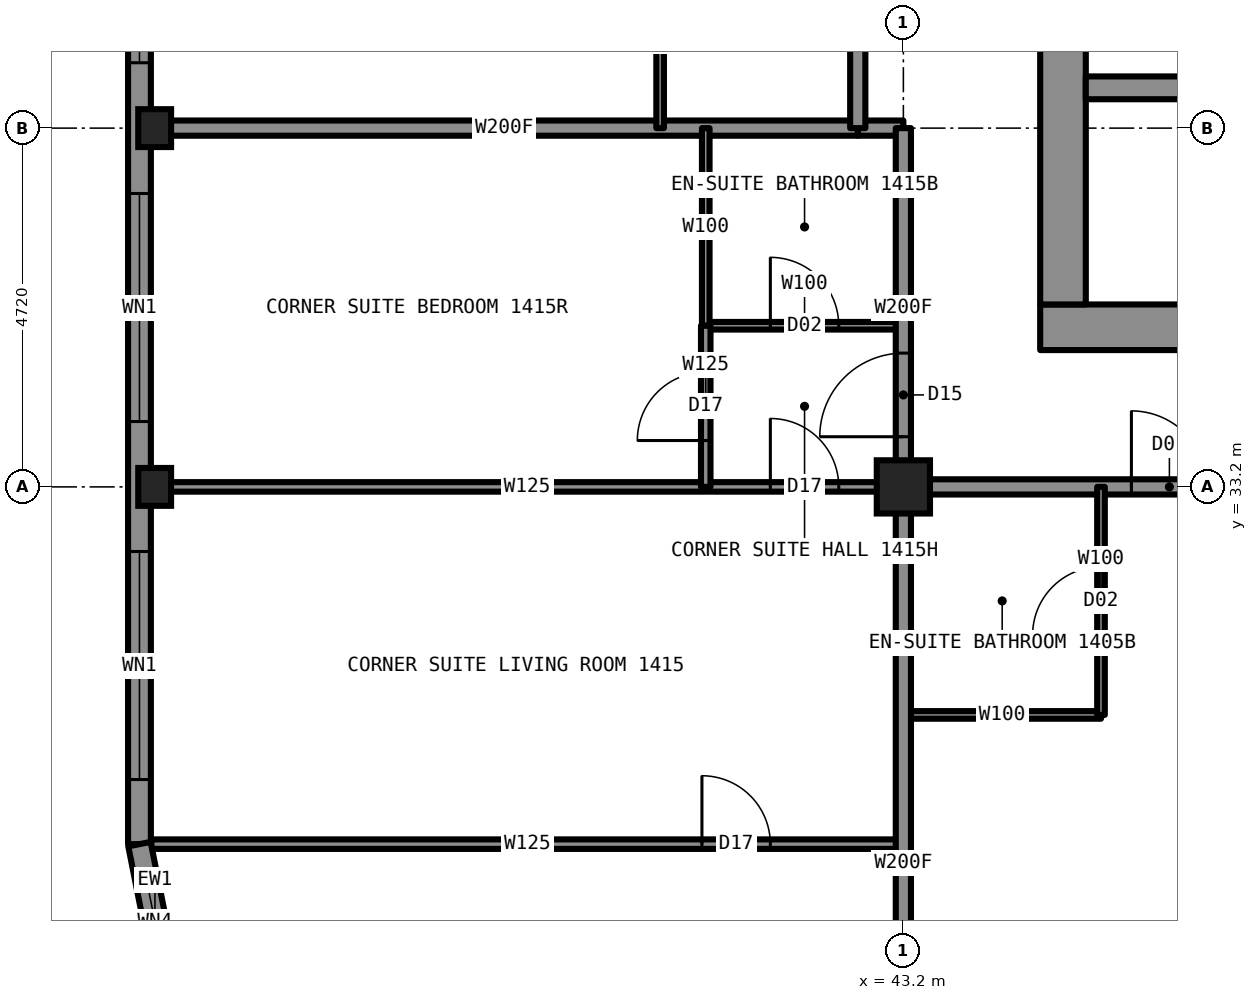
"""IFC4 building model, lengths in metres.
Left out: names, types, materials, properties, quantities, classifications, styles, units other than length and angle.
Written with IfcOpenShell. Run it as: python <this file> out.ifc"""

import sys

from ifc_helpers import new_model, si_unit, direction, frame, frame_2d, origin, origin_2d, place, context, subcontext, project, spatial, rectangle, hollow_rectangle, i_section, extrude, element, fill, save


model = new_model("IFC4")
c1 = context("Model", 3, precision=1e-05, world=origin(), true_north=direction((0.0, 1.0)))
c2 = subcontext(c1, "Body", "Model", "MODEL_VIEW")
j1 = project(units=[si_unit("LENGTHUNIT", "METRE"), si_unit("PLANEANGLEUNIT", "RADIAN")], contexts=[c1])
p1 = place(None, origin())
s1 = spatial("IfcSite", under=j1, at=p1, CompositionType="ELEMENT")
p2 = place(p1, origin())
s2 = spatial("IfcBuilding", under=s1, at=p2, CompositionType="ELEMENT")
p3 = place(p2, frame((0.0, 0.0, 49.5)))
s3 = spatial("IfcBuildingStorey", under=s2, at=p3, CompositionType="ELEMENT", Elevation=49.5)
for number, where, z_axis, x_axis in (
    (1, (33.35, 33.2, 0.0), (0.0, 0.0, 1.0), (1.0, 0.0, 0.0)),
    (2, (33.35, 37.92, 0.0), (0.0, 0.0, 1.0), (1.0, 0.0, 0.0)),
):
    element("IfcColumn", number, at=place(p3, frame(where, z_axis=z_axis, x_axis=x_axis)), inside=s3, PredefinedType="COLUMN", context=c2, shape_type="SweptSolid", body=[
        extrude(i_section(OverallWidth=0.432, OverallDepth=0.498, WebThickness=0.056, FlangeThickness=0.089, at=origin_2d()), origin(), (0.0, 0.0, 1.0), 3.5),
    ])
p4 = place(p3, frame((43.2, 33.2, 0.0), z_axis=(0.0, 0.0, 1.0), x_axis=(1.0, 0.0, 0.0)))
e3 = element("IfcColumn", 3, at=p4, inside=s3, PredefinedType="COLUMN", context=c2, shape_type="SweptSolid", body=[
    extrude(hollow_rectangle(XDim=0.7, YDim=0.7, WallThickness=0.06, at=origin_2d()), origin(), (0.0, 0.0, 1.0), 3.5),
])
p5 = place(p3, frame((45.0, 35.3, 0.0), z_axis=(0.0, 0.0, 1.0), x_axis=(1.0, 0.0, 0.0)))
e4 = element("IfcWall", 4, at=p5, inside=s3, PredefinedType="SHEAR", context=c2, shape_type="SweptSolid", body=[
    extrude(rectangle(XDim=20.0, YDim=0.6, at=frame_2d((10.0, 0.0))), origin(), (0.0, 0.0, 1.0), 3.5),
])
p6 = place(p3, frame((45.3, 35.6, 0.0), z_axis=(0.0, 0.0, 1.0), x_axis=(0.0, 1.0, 0.0)))
e5 = element("IfcWall", 5, at=p6, inside=s3, PredefinedType="SHEAR", context=c2, shape_type="SweptSolid", body=[
    extrude(rectangle(XDim=18.8, YDim=0.6, at=frame_2d((9.4, 0.0))), origin(), (0.0, 0.0, 1.0), 3.5),
])
p7 = place(p6, frame((13.4, 0.0, 0.0)))
e6 = element("IfcOpeningElement", 6, at=p7, cuts=e5, PredefinedType="OPENING", context=c2, shape_type="SweptSolid", body=[
    extrude(rectangle(XDim=1.8, YDim=2.2, at=frame_2d((0.9, 1.1))), frame((0.0, 0.31, 0.0), z_axis=(0.0, -1.0, 0.0), x_axis=(1.0, 0.0, 0.0)), (0.0, 0.0, 1.0), 0.62),
])
p8 = place(p6, frame((3.6, 0.0, 0.0)))
e7 = element("IfcOpeningElement", 7, at=p8, cuts=e5, PredefinedType="OPENING", context=c2, shape_type="SweptSolid", body=[
    extrude(rectangle(XDim=1.8, YDim=2.2, at=frame_2d((0.9, 1.1))), frame((0.0, 0.31, 0.0), z_axis=(0.0, -1.0, 0.0), x_axis=(1.0, 0.0, 0.0)), (0.0, 0.0, 1.0), 0.62),
])
p9 = place(p6, frame((6.4, 0.0, 0.0)))
e8 = element("IfcOpeningElement", 8, at=p9, cuts=e5, PredefinedType="OPENING", context=c2, shape_type="SweptSolid", body=[
    extrude(rectangle(XDim=1.2, YDim=2.2, at=frame_2d((0.6, 1.1))), frame((0.0, 0.31, 0.0), z_axis=(0.0, -1.0, 0.0), x_axis=(1.0, 0.0, 0.0)), (0.0, 0.0, 1.0), 0.62),
])
p10 = place(p3, frame((45.6, 38.45, 0.0), z_axis=(0.0, 0.0, 1.0), x_axis=(1.0, 0.0, 0.0)))
e9 = element("IfcWall", 9, at=p10, inside=s3, PredefinedType="SHEAR", context=c2, shape_type="SweptSolid", body=[
    extrude(rectangle(XDim=18.8, YDim=0.3, at=frame_2d((9.4, 0.0))), origin(), (0.0, 0.0, 1.0), 3.5),
])
p11 = place(p3, frame((43.2, 33.2, 0.0), z_axis=(0.0, 0.0, 1.0), x_axis=(1.0, 0.0, 0.0)))
e10 = element("IfcWall", 10, at=p11, inside=s3, PredefinedType="PARTITIONING", context=c2, shape_type="SweptSolid", body=[
    extrude(rectangle(XDim=23.6, YDim=0.2, at=frame_2d((11.8, 0.0))), origin(), (0.0, 0.0, 1.0), 3.33),
])
p12 = place(p11, frame((3.0, 0.0, 0.0)))
e11 = element("IfcOpeningElement", 11, at=p12, cuts=e10, PredefinedType="OPENING", context=c2, shape_type="SweptSolid", body=[
    extrude(rectangle(XDim=1.0, YDim=2.2, at=frame_2d((0.5, 1.1))), frame((0.0, 0.11, 0.0), z_axis=(0.0, -1.0, 0.0), x_axis=(1.0, 0.0, 0.0)), (0.0, 0.0, 1.0), 0.22),
])
p13 = place(p11, frame((12.44, 0.0, 0.0)))
e12 = element("IfcOpeningElement", 12, at=p13, cuts=e10, PredefinedType="OPENING", context=c2, shape_type="SweptSolid", body=[
    extrude(rectangle(XDim=1.0, YDim=2.2, at=frame_2d((0.5, 1.1))), frame((0.0, 0.11, 0.0), z_axis=(0.0, -1.0, 0.0), x_axis=(1.0, 0.0, 0.0)), (0.0, 0.0, 1.0), 0.22),
])
p14 = place(p11, frame((19.28, 0.0, 0.0)))
e13 = element("IfcOpeningElement", 13, at=p14, cuts=e10, PredefinedType="OPENING", context=c2, shape_type="SweptSolid", body=[
    extrude(rectangle(XDim=1.0, YDim=2.2, at=frame_2d((0.5, 1.1))), frame((0.0, 0.11, 0.0), z_axis=(0.0, -1.0, 0.0), x_axis=(1.0, 0.0, 0.0)), (0.0, 0.0, 1.0), 0.22),
])
p15 = place(p3, frame((33.3, 33.2, 0.0), z_axis=(0.0, 0.0, 1.0), x_axis=(1.0, 0.0, 0.0)))
e14 = element("IfcWall", 14, at=p15, inside=s3, PredefinedType="PARTITIONING", context=c2, shape_type="SweptSolid", body=[
    extrude(rectangle(XDim=9.9, YDim=0.125, at=frame_2d((4.95, 0.0))), origin(), (0.0, 0.0, 1.0), 2.573),
])
p16 = place(p15, frame((8.15, 0.0, 0.0)))
e15 = element("IfcOpeningElement", 15, at=p16, cuts=e14, PredefinedType="OPENING", context=c2, shape_type="SweptSolid", body=[
    extrude(rectangle(XDim=0.9, YDim=2.2, at=frame_2d((0.45, 1.1))), frame((0.0, 0.073, 0.0), z_axis=(0.0, -1.0, 0.0), x_axis=(1.0, 0.0, 0.0)), (0.0, 0.0, 1.0), 0.145),
])
p17 = place(p3, frame((43.2, 30.2, 0.0), z_axis=(0.0, 0.0, 1.0), x_axis=(1.0, 0.0, 0.0)))
e16 = element("IfcWall", 16, at=p17, inside=s3, PredefinedType="PARTITIONING", context=c2, shape_type="SweptSolid", body=[
    extrude(rectangle(XDim=2.6, YDim=0.1, at=frame_2d((1.3, 0.0))), origin(), (0.0, 0.0, 1.0), 3.33),
])
p18 = place(p3, frame((33.306, 28.5, 0.0), z_axis=(0.0, 0.0, 1.0), x_axis=(1.0, 0.0, 0.0)))
e17 = element("IfcWall", 17, at=p18, inside=s3, PredefinedType="PARTITIONING", context=c2, shape_type="SweptSolid", body=[
    extrude(rectangle(XDim=9.894, YDim=0.125, at=frame_2d((4.947, 0.0))), origin(), (0.0, 0.0, 1.0), 3.33),
])
p19 = place(p18, frame((7.244, 0.0, 0.0)))
e18 = element("IfcOpeningElement", 18, at=p19, cuts=e17, PredefinedType="OPENING", context=c2, shape_type="SweptSolid", body=[
    extrude(rectangle(XDim=0.9, YDim=2.2, at=frame_2d((0.45, 1.1))), frame((0.0, 0.073, 0.0), z_axis=(0.0, -1.0, 0.0), x_axis=(1.0, 0.0, 0.0)), (0.0, 0.0, 1.0), 0.145),
])
p20 = place(p3, frame((42.6, 37.92, 0.0), z_axis=(0.0, 0.0, 1.0), x_axis=(1.0, 0.0, 0.0)))
e19 = element("IfcWall", 19, at=p20, inside=s3, PredefinedType="PARTITIONING", context=c2, shape_type="SweptSolid", body=[
    extrude(rectangle(XDim=0.6, YDim=0.2, at=frame_2d((0.3, 0.0))), origin(), (0.0, 0.0, 1.0), 2.573),
])
p21 = place(p3, frame((33.3, 37.92, 0.0), z_axis=(0.0, 0.0, 1.0), x_axis=(1.0, 0.0, 0.0)))
e20 = element("IfcWall", 20, at=p21, inside=s3, PredefinedType="PARTITIONING", context=c2, shape_type="SweptSolid", body=[
    extrude(rectangle(XDim=9.3, YDim=0.2, at=frame_2d((4.65, 0.0))), origin(), (0.0, 0.0, 1.0), 2.573),
])
p22 = place(p3, frame((40.6, 35.32, 0.0), z_axis=(0.0, 0.0, 1.0), x_axis=(1.0, 0.0, 0.0)))
e21 = element("IfcWall", 21, at=p22, inside=s3, PredefinedType="PARTITIONING", context=c2, shape_type="SweptSolid", body=[
    extrude(rectangle(XDim=2.6, YDim=0.1, at=frame_2d((1.3, 0.0))), origin(), (0.0, 0.0, 1.0), 3.33),
])
p23 = place(p22, frame((0.85, 0.0, 0.0)))
e22 = element("IfcOpeningElement", 22, at=p23, cuts=e21, PredefinedType="OPENING", context=c2, shape_type="SweptSolid", body=[
    extrude(rectangle(XDim=0.9, YDim=2.1, at=frame_2d((0.45, 1.05))), frame((0.0, 0.06, 0.0), z_axis=(0.0, -1.0, 0.0), x_axis=(1.0, 0.0, 0.0)), (0.0, 0.0, 1.0), 0.12),
])
p24 = place(p3, frame((43.2, 33.2, 0.0), z_axis=(0.0, 0.0, 1.0), x_axis=(0.0, 1.0, 0.0)))
e23 = element("IfcWall", 23, at=p24, inside=s3, PredefinedType="PARTITIONING", context=c2, shape_type="SweptSolid", body=[
    extrude(rectangle(XDim=4.72, YDim=0.2, at=frame_2d((2.36, 0.0))), origin(), (0.0, 0.0, 1.0), 3.33),
])
p25 = place(p24, frame((0.66, 0.0, 0.0)))
e24 = element("IfcOpeningElement", 24, at=p25, cuts=e23, PredefinedType="OPENING", context=c2, shape_type="SweptSolid", body=[
    extrude(rectangle(XDim=1.1, YDim=2.2, at=frame_2d((0.55, 1.1))), frame((0.0, 0.11, 0.0), z_axis=(0.0, -1.0, 0.0), x_axis=(1.0, 0.0, 0.0)), (0.0, 0.0, 1.0), 0.22),
])
p26 = place(p3, frame((43.2, 23.3, 0.0), z_axis=(0.0, 0.0, 1.0), x_axis=(0.0, 1.0, 0.0)))
e25 = element("IfcWall", 25, at=p26, inside=s3, PredefinedType="PARTITIONING", context=c2, shape_type="SweptSolid", body=[
    extrude(rectangle(XDim=9.9, YDim=0.2, at=frame_2d((4.95, 0.0))), origin(), (0.0, 0.0, 1.0), 2.573),
])
p27 = place(p3, frame((42.6, 37.92, 0.0), z_axis=(0.0, 0.0, 1.0), x_axis=(0.0, 1.0, 0.0)))
e26 = element("IfcWall", 26, at=p27, inside=s3, PredefinedType="PARTITIONING", context=c2, shape_type="SweptSolid", body=[
    extrude(rectangle(XDim=14.16, YDim=0.2, at=frame_2d((7.08, 0.0))), origin(), (0.0, 0.0, 1.0), 3.33),
])
p28 = place(p27, frame((2.55, 0.0, 0.0)))
e27 = element("IfcOpeningElement", 27, at=p28, cuts=e26, PredefinedType="OPENING", context=c2, shape_type="SweptSolid", body=[
    extrude(rectangle(XDim=1.0, YDim=2.2, at=frame_2d((0.5, 1.1))), frame((0.0, 0.11, 0.0), z_axis=(0.0, -1.0, 0.0), x_axis=(1.0, 0.0, 0.0)), (0.0, 0.0, 1.0), 0.22),
])
p29 = place(p27, frame((6.18, 0.0, 0.0)))
e28 = element("IfcOpeningElement", 28, at=p29, cuts=e26, PredefinedType="OPENING", context=c2, shape_type="SweptSolid", body=[
    extrude(rectangle(XDim=1.0, YDim=2.2, at=frame_2d((0.5, 1.1))), frame((0.0, 0.11, 0.0), z_axis=(0.0, -1.0, 0.0), x_axis=(1.0, 0.0, 0.0)), (0.0, 0.0, 1.0), 0.22),
])
p30 = place(p27, frame((11.99, 0.0, 0.0)))
e29 = element("IfcOpeningElement", 29, at=p30, cuts=e26, PredefinedType="OPENING", context=c2, shape_type="SweptSolid", body=[
    extrude(rectangle(XDim=1.0, YDim=2.2, at=frame_2d((0.5, 1.1))), frame((0.0, 0.11, 0.0), z_axis=(0.0, -1.0, 0.0), x_axis=(1.0, 0.0, 0.0)), (0.0, 0.0, 1.0), 0.22),
])
p31 = place(p3, frame((40.6, 35.32, 0.0), z_axis=(0.0, 0.0, 1.0), x_axis=(0.0, 1.0, 0.0)))
e30 = element("IfcWall", 30, at=p31, inside=s3, PredefinedType="PARTITIONING", context=c2, shape_type="SweptSolid", body=[
    extrude(rectangle(XDim=2.6, YDim=0.1, at=frame_2d((1.3, 0.0))), origin(), (0.0, 0.0, 1.0), 3.33),
])
p32 = place(p3, frame((40.6, 33.2, 0.0), z_axis=(0.0, 0.0, 1.0), x_axis=(0.0, 1.0, 0.0)))
e31 = element("IfcWall", 31, at=p32, inside=s3, PredefinedType="PARTITIONING", context=c2, shape_type="SweptSolid", body=[
    extrude(rectangle(XDim=2.12, YDim=0.125, at=frame_2d((1.06, 0.0))), origin(), (0.0, 0.0, 1.0), 3.33),
])
p33 = place(p32, frame((0.61, 0.0, 0.0)))
e32 = element("IfcOpeningElement", 32, at=p33, cuts=e31, PredefinedType="OPENING", context=c2, shape_type="SweptSolid", body=[
    extrude(rectangle(XDim=0.9, YDim=2.2, at=frame_2d((0.45, 1.1))), frame((0.0, 0.073, 0.0), z_axis=(0.0, -1.0, 0.0), x_axis=(1.0, 0.0, 0.0)), (0.0, 0.0, 1.0), 0.145),
])
p34 = place(p3, frame((40.0, 37.92, 0.0), z_axis=(0.0, 0.0, 1.0), x_axis=(0.0, 1.0, 0.0)))
e33 = element("IfcWall", 33, at=p34, inside=s3, PredefinedType="PARTITIONING", context=c2, shape_type="SweptSolid", body=[
    extrude(rectangle(XDim=2.3, YDim=0.1, at=frame_2d((1.15, 0.0))), origin(), (0.0, 0.0, 1.0), 3.33),
])
p35 = place(p3, frame((45.8, 30.2, 0.0), z_axis=(0.0, 0.0, 1.0), x_axis=(0.0, 1.0, 0.0)))
e34 = element("IfcWall", 34, at=p35, inside=s3, PredefinedType="PARTITIONING", context=c2, shape_type="SweptSolid", body=[
    extrude(rectangle(XDim=3.0, YDim=0.1, at=frame_2d((1.5, 0.0))), origin(), (0.0, 0.0, 1.0), 3.33),
])
p36 = place(p35, frame((1.05, 0.0, 0.0)))
e35 = element("IfcOpeningElement", 35, at=p36, cuts=e34, PredefinedType="OPENING", context=c2, shape_type="SweptSolid", body=[
    extrude(rectangle(XDim=0.9, YDim=2.1, at=frame_2d((0.45, 1.05))), frame((0.0, 0.06, 0.0), z_axis=(0.0, -1.0, 0.0), x_axis=(1.0, 0.0, 0.0)), (0.0, 0.0, 1.0), 0.12),
])
p37 = place(p3, frame((33.15, 61.5, 0.0), z_axis=(0.0, 0.0, 1.0), x_axis=(0.0, -1.0, 0.0)))
e36 = element("IfcWall", 36, at=p37, inside=s3, PredefinedType="SOLIDWALL", context=c2, shape_type="SweptSolid", body=[
    extrude(rectangle(XDim=33.0, YDim=0.3, at=frame_2d((16.5, 0.0))), origin(), (0.0, 0.0, 1.0), 2.83),
])
p38 = place(p37, frame((0.85, 0.0, 0.5)))
e37 = element("IfcOpeningElement", 37, at=p38, cuts=e36, PredefinedType="OPENING", context=c2, shape_type="SweptSolid", body=[
    extrude(rectangle(XDim=3.0, YDim=2.0, at=frame_2d((1.5, 1.0))), frame((0.0, 0.16, 0.0), z_axis=(0.0, -1.0, 0.0), x_axis=(1.0, 0.0, 0.0)), (0.0, 0.0, 1.0), 0.32),
])
p39 = place(p37, frame((5.56, 0.0, 0.5)))
e38 = element("IfcOpeningElement", 38, at=p39, cuts=e36, PredefinedType="OPENING", context=c2, shape_type="SweptSolid", body=[
    extrude(rectangle(XDim=3.0, YDim=2.0, at=frame_2d((1.5, 1.0))), frame((0.0, 0.16, 0.0), z_axis=(0.0, -1.0, 0.0), x_axis=(1.0, 0.0, 0.0)), (0.0, 0.0, 1.0), 0.32),
])
p40 = place(p37, frame((10.28, 0.0, 1.1)))
e39 = element("IfcOpeningElement", 39, at=p40, cuts=e36, PredefinedType="OPENING", context=c2, shape_type="SweptSolid", body=[
    extrude(rectangle(XDim=1.1, YDim=1.4, at=frame_2d((0.55, 0.7))), frame((0.0, 0.16, 0.0), z_axis=(0.0, -1.0, 0.0), x_axis=(1.0, 0.0, 0.0)), (0.0, 0.0, 1.0), 0.32),
])
p41 = place(p37, frame((15.0, 0.0, 0.5)))
e40 = element("IfcOpeningElement", 40, at=p41, cuts=e36, PredefinedType="OPENING", context=c2, shape_type="SweptSolid", body=[
    extrude(rectangle(XDim=3.0, YDim=2.0, at=frame_2d((1.5, 1.0))), frame((0.0, 0.16, 0.0), z_axis=(0.0, -1.0, 0.0), x_axis=(1.0, 0.0, 0.0)), (0.0, 0.0, 1.0), 0.32),
])
p42 = place(p37, frame((21.62, 0.0, 1.1)))
e41 = element("IfcOpeningElement", 41, at=p42, cuts=e36, PredefinedType="OPENING", context=c2, shape_type="SweptSolid", body=[
    extrude(rectangle(XDim=1.1, YDim=1.4, at=frame_2d((0.55, 0.7))), frame((0.0, 0.16, 0.0), z_axis=(0.0, -1.0, 0.0), x_axis=(1.0, 0.0, 0.0)), (0.0, 0.0, 1.0), 0.32),
])
p43 = place(p37, frame((24.44, 0.0, 0.5)))
e42 = element("IfcOpeningElement", 42, at=p43, cuts=e36, PredefinedType="OPENING", context=c2, shape_type="SweptSolid", body=[
    extrude(rectangle(XDim=3.0, YDim=2.0, at=frame_2d((1.5, 1.0))), frame((0.0, 0.16, 0.0), z_axis=(0.0, -1.0, 0.0), x_axis=(1.0, 0.0, 0.0)), (0.0, 0.0, 1.0), 0.32),
])
p44 = place(p37, frame((29.15, 0.0, 0.5)))
e43 = element("IfcOpeningElement", 43, at=p44, cuts=e36, PredefinedType="OPENING", context=c2, shape_type="SweptSolid", body=[
    extrude(rectangle(XDim=3.0, YDim=2.0, at=frame_2d((1.5, 1.0))), frame((0.0, 0.16, 0.0), z_axis=(0.0, -1.0, 0.0), x_axis=(1.0, 0.0, 0.0)), (0.0, 0.0, 1.0), 0.32),
])
p45 = place(p3, frame((33.15, 28.5, 0.0), z_axis=(0.0, 0.0, 1.0), x_axis=(0.195081421501, -0.980787050784, 0.0)))
e44 = element("IfcWall", 44, at=p45, inside=s3, PredefinedType="SOLIDWALL", context=c2, shape_type="SweptSolid", body=[
    extrude(rectangle(XDim=2.087, YDim=0.3, at=frame_2d((1.044, 0.0))), origin(), (0.0, 0.0, 1.0), 3.33),
])
p46 = place(p45, frame((0.444, 0.0, 0.5)))
e45 = element("IfcOpeningElement", 45, at=p46, cuts=e44, PredefinedType="OPENING", context=c2, shape_type="SweptSolid", body=[
    extrude(rectangle(XDim=1.2, YDim=2.0, at=frame_2d((0.6, 1.0))), frame((0.0, 0.16, 0.0), z_axis=(0.0, -1.0, 0.0), x_axis=(1.0, 0.0, 0.0)), (0.0, 0.0, 1.0), 0.32),
])
p47 = place(p12, origin())
e46 = element("IfcDoor", 46, at=p47, inside=s3, OperationType="SINGLE_SWING_LEFT", PredefinedType="DOOR", context=c2, shape_type="SweptSolid", body=[
    extrude(rectangle(XDim=1.0, YDim=2.2, at=frame_2d((0.5, 1.1))), frame((0.0, 0.025, 0.0), z_axis=(0.0, -1.0, 0.0), x_axis=(1.0, 0.0, 0.0)), (0.0, 0.0, 1.0), 0.05),
])
fill(e11, e46)
p48 = place(p36, origin())
e47 = element("IfcDoor", 47, at=p48, inside=s3, OperationType="SINGLE_SWING_RIGHT", PredefinedType="DOOR", context=c2, shape_type="SweptSolid", body=[
    extrude(rectangle(XDim=0.9, YDim=2.1, at=frame_2d((0.45, 1.05))), frame((0.0, 0.025, 0.0), z_axis=(0.0, -1.0, 0.0), x_axis=(1.0, 0.0, 0.0)), (0.0, 0.0, 1.0), 0.05),
])
fill(e35, e47)
p49 = place(p16, origin())
e48 = element("IfcDoor", 48, at=p49, inside=s3, OperationType="SINGLE_SWING_LEFT", PredefinedType="DOOR", context=c2, shape_type="SweptSolid", body=[
    extrude(rectangle(XDim=0.9, YDim=2.2, at=frame_2d((0.45, 1.1))), frame((0.0, 0.025, 0.0), z_axis=(0.0, -1.0, 0.0), x_axis=(1.0, 0.0, 0.0)), (0.0, 0.0, 1.0), 0.05),
])
fill(e15, e48)
p50 = place(p23, origin())
e49 = element("IfcDoor", 49, at=p50, inside=s3, OperationType="SINGLE_SWING_RIGHT", PredefinedType="DOOR", context=c2, shape_type="SweptSolid", body=[
    extrude(rectangle(XDim=0.9, YDim=2.1, at=frame_2d((0.45, 1.05))), frame((0.0, 0.025, 0.0), z_axis=(0.0, -1.0, 0.0), x_axis=(1.0, 0.0, 0.0)), (0.0, 0.0, 1.0), 0.05),
])
fill(e22, e49)
p51 = place(p25, origin())
e50 = element("IfcDoor", 50, at=p51, inside=s3, OperationType="SINGLE_SWING_LEFT", PredefinedType="DOOR", context=c2, shape_type="SweptSolid", body=[
    extrude(rectangle(XDim=1.1, YDim=2.2, at=frame_2d((0.55, 1.1))), frame((0.0, 0.025, 0.0), z_axis=(0.0, -1.0, 0.0), x_axis=(1.0, 0.0, 0.0)), (0.0, 0.0, 1.0), 0.05),
])
fill(e24, e50)
p52 = place(p19, origin())
e51 = element("IfcDoor", 51, at=p52, inside=s3, OperationType="SINGLE_SWING_LEFT", PredefinedType="DOOR", context=c2, shape_type="SweptSolid", body=[
    extrude(rectangle(XDim=0.9, YDim=2.2, at=frame_2d((0.45, 1.1))), frame((0.0, 0.025, 0.0), z_axis=(0.0, -1.0, 0.0), x_axis=(1.0, 0.0, 0.0)), (0.0, 0.0, 1.0), 0.05),
])
fill(e18, e51)
p53 = place(p33, origin())
e52 = element("IfcDoor", 52, at=p53, inside=s3, OperationType="SINGLE_SWING_LEFT", PredefinedType="DOOR", context=c2, shape_type="SweptSolid", body=[
    extrude(rectangle(XDim=0.9, YDim=2.2, at=frame_2d((0.45, 1.1))), frame((0.0, 0.025, 0.0), z_axis=(0.0, -1.0, 0.0), x_axis=(1.0, 0.0, 0.0)), (0.0, 0.0, 1.0), 0.05),
])
fill(e32, e52)
p54 = place(p42, origin())
e53 = element("IfcWindow", 53, at=p54, inside=s3, PartitioningType="SINGLE_PANEL", PredefinedType="WINDOW", context=c2, shape_type="SweptSolid", body=[
    extrude(rectangle(XDim=1.1, YDim=1.4, at=frame_2d((0.55, 0.7))), frame((0.0, 0.03, 0.0), z_axis=(0.0, -1.0, 0.0), x_axis=(1.0, 0.0, 0.0)), (0.0, 0.0, 1.0), 0.06),
])
fill(e41, e53)
p55 = place(p43, origin())
e54 = element("IfcWindow", 54, at=p55, inside=s3, PartitioningType="SINGLE_PANEL", PredefinedType="WINDOW", context=c2, shape_type="SweptSolid", body=[
    extrude(rectangle(XDim=3.0, YDim=2.0, at=frame_2d((1.5, 1.0))), frame((0.0, 0.03, 0.0), z_axis=(0.0, -1.0, 0.0), x_axis=(1.0, 0.0, 0.0)), (0.0, 0.0, 1.0), 0.06),
])
fill(e42, e54)
p56 = place(p44, origin())
e55 = element("IfcWindow", 55, at=p56, inside=s3, PartitioningType="SINGLE_PANEL", PredefinedType="WINDOW", context=c2, shape_type="SweptSolid", body=[
    extrude(rectangle(XDim=3.0, YDim=2.0, at=frame_2d((1.5, 1.0))), frame((0.0, 0.03, 0.0), z_axis=(0.0, -1.0, 0.0), x_axis=(1.0, 0.0, 0.0)), (0.0, 0.0, 1.0), 0.06),
])
fill(e43, e55)
p57 = place(p46, origin())
e56 = element("IfcWindow", 56, at=p57, inside=s3, PartitioningType="SINGLE_PANEL", PredefinedType="WINDOW", context=c2, shape_type="SweptSolid", body=[
    extrude(rectangle(XDim=1.2, YDim=2.0, at=frame_2d((0.6, 1.0))), frame((0.0, 0.03, 0.0), z_axis=(0.0, -1.0, 0.0), x_axis=(1.0, 0.0, 0.0)), (0.0, 0.0, 1.0), 0.06),
])
fill(e45, e56)
save(model, sys.argv[1])
